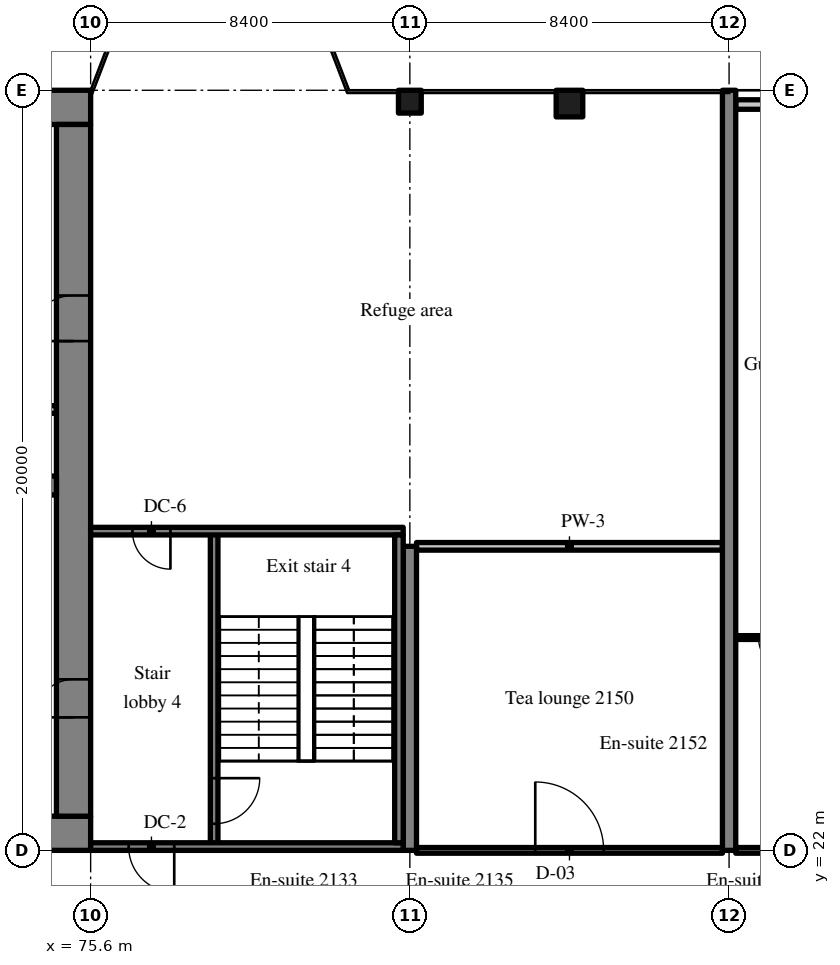
"""IFC4 building model, lengths in metres.
Left out: names, types, materials, properties, quantities, classifications, styles, units other than length and angle.
Written with IfcOpenShell. Run it as: python <this file> out.ifc"""

import sys

from ifc_helpers import new_model, si_unit, direction, frame, frame_2d, origin, origin_2d, place, context, subcontext, project, spatial, rectangle, extrude, source, transform, mapped, element, fill, save


model = new_model("IFC4")
c1 = context("Model", 3, precision=1e-05, world=origin(), true_north=direction((0.0, 1.0)))
c2 = subcontext(c1, "Body", "Model", "MODEL_VIEW")
j1 = project(units=[si_unit("LENGTHUNIT", "METRE"), si_unit("PLANEANGLEUNIT", "RADIAN")], contexts=[c1])
p1 = place(None, origin())
s1 = spatial("IfcSite", under=j1, at=p1, CompositionType="ELEMENT")
p2 = place(p1, origin())
s2 = spatial("IfcBuilding", under=s1, at=p2, CompositionType="ELEMENT")
p3 = place(p2, frame((0.0, 0.0, 91.4)))
s3 = spatial("IfcBuildingStorey", under=s2, at=p3, CompositionType="ELEMENT", Elevation=91.4)
m1 = source(origin(), c2, "Body", "SweptSolid", [
    extrude(rectangle(XDim=50.4, YDim=0.9, at=frame_2d((25.2, 0.0))), origin(), (0.0, 0.0, 1.0), 3.52),
])
p4 = place(p3, frame((25.2, 22.45, 0.0), z_axis=(0.0, 0.0, 1.0), x_axis=(1.0, 0.0, 0.0)))
e1 = element("IfcWall", 1, at=p4, inside=s3, PredefinedType="SHEAR", context=c2, shape_type="MappedRepresentation", body=[
    mapped(m1, transform((0.0, 0.0, 0.0), scale=1.0)),
])
m2 = source(origin(), c2, "Body", "SweptSolid", [
    extrude(rectangle(XDim=1.8, YDim=2.1, at=frame_2d((0.9, 1.05))), frame((0.0, 0.46, 0.0), z_axis=(0.0, -1.0, 0.0), x_axis=(1.0, 0.0, 0.0)), (0.0, 0.0, 1.0), 0.92),
])
p5 = place(p4, frame((15.9, 0.0, 0.0)))
e2 = element("IfcOpeningElement", 2, at=p5, cuts=e1, PredefinedType="OPENING", context=c2, shape_type="MappedRepresentation", body=[
    mapped(m2, transform((0.0, 0.0, 0.0), scale=1.0)),
])
m3 = source(origin(), c2, "Body", "SweptSolid", [
    extrude(rectangle(XDim=1.2, YDim=2.1, at=frame_2d((0.6, 1.05))), frame((0.0, 0.46, 0.0), z_axis=(0.0, -1.0, 0.0), x_axis=(1.0, 0.0, 0.0)), (0.0, 0.0, 1.0), 0.92),
])
p6 = place(p4, frame((26.975, 0.0, 0.0)))
e3 = element("IfcOpeningElement", 3, at=p6, cuts=e1, PredefinedType="OPENING", context=c2, shape_type="MappedRepresentation", body=[
    mapped(m3, transform((0.0, 0.0, 0.0), scale=1.0)),
])
m4 = source(origin(), c2, "Body", "SweptSolid", [
    extrude(rectangle(XDim=0.9, YDim=2.1, at=frame_2d((0.45, 1.05))), frame((0.0, 0.46, 0.0), z_axis=(0.0, -1.0, 0.0), x_axis=(1.0, 0.0, 0.0)), (0.0, 0.0, 1.0), 0.92),
])
p7 = place(p4, frame((34.5, 0.0, 0.0)))
e4 = element("IfcOpeningElement", 4, at=p7, cuts=e1, PredefinedType="OPENING", context=c2, shape_type="MappedRepresentation", body=[
    mapped(m4, transform((0.0, 0.0, 0.0), scale=1.0)),
])
p8 = place(p4, frame((31.5, 0.0, 0.0)))
e5 = element("IfcOpeningElement", 5, at=p8, cuts=e1, PredefinedType="OPENING", context=c2, shape_type="MappedRepresentation", body=[
    mapped(m4, transform((0.0, 0.0, 0.0), scale=1.0)),
])
p9 = place(p4, frame((39.788, 0.0, 0.0)))
e6 = element("IfcOpeningElement", 6, at=p9, cuts=e1, PredefinedType="OPENING", context=c2, shape_type="MappedRepresentation", body=[
    mapped(m4, transform((0.0, 0.0, 0.0), scale=1.0)),
])
p10 = place(p4, frame((36.762, 0.0, 0.0)))
e7 = element("IfcOpeningElement", 7, at=p10, cuts=e1, PredefinedType="OPENING", context=c2, shape_type="MappedRepresentation", body=[
    mapped(m4, transform((0.0, 0.0, 0.0), scale=1.0)),
])
p11 = place(p4, frame((6.45, 0.0, 0.0)))
e8 = element("IfcOpeningElement", 8, at=p11, cuts=e1, PredefinedType="OPENING", context=c2, shape_type="MappedRepresentation", body=[
    mapped(m3, transform((0.0, 0.0, 0.0), scale=1.0)),
])
p12 = place(p4, frame((47.775, 0.0, 0.0)))
e9 = element("IfcOpeningElement", 9, at=p12, cuts=e1, PredefinedType="OPENING", context=c2, shape_type="MappedRepresentation", body=[
    mapped(m3, transform((0.0, 0.0, 0.0), scale=1.0)),
])
p13 = place(p3, frame((25.2, 41.55, 0.0), z_axis=(0.0, 0.0, 1.0), x_axis=(1.0, 0.0, 0.0)))
e10 = element("IfcWall", 10, at=p13, inside=s3, PredefinedType="SHEAR", context=c2, shape_type="MappedRepresentation", body=[
    mapped(m1, transform((0.0, 0.0, 0.0), scale=1.0)),
])
m5 = source(origin(), c2, "Body", "SweptSolid", [
    extrude(rectangle(XDim=18.2, YDim=0.9, at=frame_2d((9.1, 0.0))), origin(), (0.0, 0.0, 1.0), 3.52),
])
p14 = place(p3, frame((75.15, 22.9, 0.0), z_axis=(0.0, 0.0, 1.0), x_axis=(0.0, 1.0, 0.0)))
e11 = element("IfcWall", 11, at=p14, inside=s3, PredefinedType="SHEAR", context=c2, shape_type="MappedRepresentation", body=[
    mapped(m5, transform((0.0, 0.0, 0.0), scale=1.0)),
])
m6 = source(origin(), c2, "Body", "SweptSolid", [
    extrude(rectangle(XDim=1.0, YDim=2.1, at=frame_2d((0.5, 1.05))), frame((0.0, 0.46, 0.0), z_axis=(0.0, -1.0, 0.0), x_axis=(1.0, 0.0, 0.0)), (0.0, 0.0, 1.0), 0.92),
])
p15 = place(p14, frame((2.6, 0.0, 0.0)))
e12 = element("IfcOpeningElement", 12, at=p15, cuts=e11, PredefinedType="OPENING", context=c2, shape_type="MappedRepresentation", body=[
    mapped(m6, transform((0.0, 0.0, 0.0), scale=1.0)),
])
p16 = place(p14, frame((12.5, 0.0, 0.0)))
e13 = element("IfcOpeningElement", 13, at=p16, cuts=e11, PredefinedType="OPENING", context=c2, shape_type="MappedRepresentation", body=[
    mapped(m3, transform((0.0, 0.0, 0.0), scale=1.0)),
])
m7 = source(origin(), c2, "Body", "SweptSolid", [
    extrude(rectangle(XDim=7.25, YDim=0.5, at=frame_2d((3.625, 0.0))), origin(), (0.0, 0.0, 1.0), 3.52),
])
p17 = place(p3, frame((67.45, 31.6, 0.0), z_axis=(0.0, 0.0, 1.0), x_axis=(1.0, 0.0, 0.0)))
e14 = element("IfcWall", 14, at=p17, inside=s3, PredefinedType="SHEAR", context=c2, shape_type="MappedRepresentation", body=[
    mapped(m7, transform((0.0, 0.0, 0.0), scale=1.0)),
])
m8 = source(origin(), c2, "Body", "SweptSolid", [
    extrude(rectangle(XDim=1.1, YDim=2.1, at=frame_2d((0.55, 1.05))), frame((0.0, 0.26, 0.0), z_axis=(0.0, -1.0, 0.0), x_axis=(1.0, 0.0, 0.0)), (0.0, 0.0, 1.0), 0.52),
])
p18 = place(p17, frame((5.575, 0.0, 0.0)))
e15 = element("IfcOpeningElement", 15, at=p18, cuts=e14, PredefinedType="OPENING", context=c2, shape_type="MappedRepresentation", body=[
    mapped(m8, transform((0.0, 0.0, 0.0), scale=1.0)),
])
m9 = source(origin(), c2, "Body", "SweptSolid", [
    extrude(rectangle(XDim=8.0, YDim=0.35, at=frame_2d((4.0, 0.0))), origin(), (0.0, 0.0, 1.0), 3.52),
])
p19 = place(p3, frame((84.0, 22.0, 0.0), z_axis=(0.0, 0.0, 1.0), x_axis=(0.0, 1.0, 0.0)))
e16 = element("IfcWall", 16, at=p19, inside=s3, PredefinedType="SHEAR", context=c2, shape_type="MappedRepresentation", body=[
    mapped(m9, transform((0.0, 0.0, 0.0), scale=1.0)),
])
m10 = source(origin(), c2, "Body", "SweptSolid", [
    extrude(rectangle(XDim=20.0, YDim=0.35, at=frame_2d((10.0, 0.0))), origin(), (0.0, 0.0, 1.0), 3.52),
])
p20 = place(p3, frame((92.4, 22.0, 0.0), z_axis=(0.0, 0.0, 1.0), x_axis=(0.0, 1.0, 0.0)))
e17 = element("IfcWall", 17, at=p20, inside=s3, PredefinedType="SHEAR", context=c2, shape_type="MappedRepresentation", body=[
    mapped(m10, transform((0.0, 0.0, 0.0), scale=1.0)),
])
m11 = source(origin(), c2, "Body", "SweptSolid", [
    extrude(rectangle(XDim=0.6, YDim=0.6, at=origin_2d()), origin(), (0.0, 0.0, 1.0), 3.52),
])
p21 = place(p3, frame((84.0, 41.7, 0.0), z_axis=(0.0, 0.0, 1.0), x_axis=(1.0, 0.0, 0.0)))
e18 = element("IfcColumn", 18, at=p21, inside=s3, PredefinedType="COLUMN", context=c2, shape_type="MappedRepresentation", body=[
    mapped(m11, transform((0.0, 0.0, 0.0), scale=1.0)),
])
m12 = source(origin(), c2, "Body", "SweptSolid", [
    extrude(rectangle(XDim=0.7, YDim=0.7, at=origin_2d()), origin(), (0.0, 0.0, 1.0), 3.52),
])
p22 = place(p3, frame((88.2, 41.65, 0.0), z_axis=(0.0, 0.0, 1.0), x_axis=(1.0, 0.0, 0.0)))
e19 = element("IfcColumn", 19, at=p22, inside=s3, PredefinedType="COLUMN", context=c2, shape_type="MappedRepresentation", body=[
    mapped(m12, transform((0.0, 0.0, 0.0), scale=1.0)),
])
m13 = source(origin(), c2, "Body", "SweptSolid", [
    extrude(rectangle(XDim=4.07, YDim=0.25, at=frame_2d((2.035, 0.0))), origin(), (0.0, 0.0, 1.0), 2.82),
])
p23 = place(p3, frame((96.645, 41.625, 0.0), z_axis=(0.0, 0.0, 1.0), x_axis=(-1.0, 0.0, 0.0)))
e20 = element("IfcWall", 20, at=p23, inside=s3, PredefinedType="SOLIDWALL", context=c2, shape_type="MappedRepresentation", body=[
    mapped(m13, transform((0.0, 0.0, 0.0), scale=1.0)),
])
m14 = source(origin(), c2, "Body", "SweptSolid", [
    extrude(rectangle(XDim=1.5, YDim=1.5, at=frame_2d((0.75, 0.75))), frame((0.0, 0.135, 0.0), z_axis=(0.0, -1.0, 0.0), x_axis=(1.0, 0.0, 0.0)), (0.0, 0.0, 1.0), 0.27),
])
p24 = place(p23, frame((1.285, 0.0, 0.9)))
e21 = element("IfcOpeningElement", 21, at=p24, cuts=e20, PredefinedType="OPENING", context=c2, shape_type="MappedRepresentation", body=[
    mapped(m14, transform((0.0, 0.0, 0.0), scale=1.0)),
])
m15 = source(origin(), c2, "Body", "SweptSolid", [
    extrude(rectangle(XDim=2.25, YDim=0.2, at=frame_2d((1.125, 0.0))), origin(), (0.0, 0.0, 1.0), 3.52),
])
p25 = place(p3, frame((72.45, 33.6, 0.0), z_axis=(0.0, 0.0, 1.0), x_axis=(1.0, 0.0, 0.0)))
e22 = element("IfcWall", 22, at=p25, inside=s3, PredefinedType="SOLIDWALL", context=c2, shape_type="MappedRepresentation", body=[
    mapped(m15, transform((0.0, 0.0, 0.0), scale=1.0)),
])
m16 = source(origin(), c2, "Body", "SweptSolid", [
    extrude(rectangle(XDim=8.3, YDim=0.2, at=frame_2d((4.15, 0.0))), origin(), (0.0, 0.0, 1.0), 3.52),
])
p26 = place(p3, frame((78.85, 22.1, 0.0), z_axis=(0.0, 0.0, 1.0), x_axis=(0.0, 1.0, 0.0)))
e23 = element("IfcWall", 23, at=p26, inside=s3, PredefinedType="SOLIDWALL", context=c2, shape_type="MappedRepresentation", body=[
    mapped(m16, transform((0.0, 0.0, 0.0), scale=1.0)),
])
m17 = source(origin(), c2, "Body", "SweptSolid", [
    extrude(rectangle(XDim=1.2, YDim=2.1, at=frame_2d((0.6, 1.05))), frame((0.0, 0.11, 0.0), z_axis=(0.0, -1.0, 0.0), x_axis=(1.0, 0.0, 0.0)), (0.0, 0.0, 1.0), 0.22),
])
p27 = place(p26, frame((0.6, 0.0, 0.0)))
e24 = element("IfcOpeningElement", 24, at=p27, cuts=e23, PredefinedType="OPENING", context=c2, shape_type="MappedRepresentation", body=[
    mapped(m17, transform((0.0, 0.0, 0.0), scale=1.0)),
])
m18 = source(origin(), c2, "Body", "SweptSolid", [
    extrude(rectangle(XDim=8.225, YDim=0.2, at=frame_2d((4.112, 0.0))), origin(), (0.0, 0.0, 1.0), 3.52),
])
p28 = place(p3, frame((83.825, 22.1, 0.0), z_axis=(0.0, 0.0, 1.0), x_axis=(-1.0, 0.0, 0.0)))
e25 = element("IfcWall", 25, at=p28, inside=s3, PredefinedType="SOLIDWALL", context=c2, shape_type="MappedRepresentation", body=[
    mapped(m18, transform((0.0, 0.0, 0.0), scale=1.0)),
])
p29 = place(p28, frame((6.025, 0.0, 0.0)))
e26 = element("IfcOpeningElement", 26, at=p29, cuts=e25, PredefinedType="OPENING", context=c2, shape_type="MappedRepresentation", body=[
    mapped(m17, transform((0.0, 0.0, 0.0), scale=1.0)),
])
p30 = place(p3, frame((83.825, 30.4, 0.0), z_axis=(0.0, 0.0, 1.0), x_axis=(-1.0, 0.0, 0.0)))
e27 = element("IfcWall", 27, at=p30, inside=s3, PredefinedType="SOLIDWALL", context=c2, shape_type="MappedRepresentation", body=[
    mapped(m18, transform((0.0, 0.0, 0.0), scale=1.0)),
])
m19 = source(origin(), c2, "Body", "SweptSolid", [
    extrude(rectangle(XDim=1.0, YDim=2.1, at=frame_2d((0.5, 1.05))), frame((0.0, 0.11, 0.0), z_axis=(0.0, -1.0, 0.0), x_axis=(1.0, 0.0, 0.0)), (0.0, 0.0, 1.0), 0.22),
])
p31 = place(p30, frame((6.125, 0.0, 0.0)))
e28 = element("IfcOpeningElement", 28, at=p31, cuts=e27, PredefinedType="OPENING", context=c2, shape_type="MappedRepresentation", body=[
    mapped(m19, transform((0.0, 0.0, 0.0), scale=1.0)),
])
m20 = source(origin(), c2, "Body", "SweptSolid", [
    extrude(rectangle(XDim=8.1, YDim=0.225, at=frame_2d((4.05, 0.0))), origin(), (0.0, 0.0, 1.0), 3.52),
])
p32 = place(p3, frame((83.713, 22.2, 0.0), z_axis=(0.0, 0.0, 1.0), x_axis=(0.0, 1.0, 0.0)))
e29 = element("IfcWall", 29, at=p32, inside=s3, PredefinedType="SOLIDWALL", context=c2, shape_type="MappedRepresentation", body=[
    mapped(m20, transform((0.0, 0.0, 0.0), scale=1.0)),
])
m21 = source(origin(), c2, "Body", "SweptSolid", [
    extrude(rectangle(XDim=8.05, YDim=0.15, at=frame_2d((4.025, 0.0))), origin(), (0.0, 0.0, 1.0), 2.82),
])
p33 = place(p3, frame((84.175, 22.0, 0.0), z_axis=(0.0, 0.0, 1.0), x_axis=(1.0, 0.0, 0.0)))
e30 = element("IfcWall", 30, at=p33, inside=s3, PredefinedType="PARTITIONING", context=c2, shape_type="MappedRepresentation", body=[
    mapped(m21, transform((0.0, 0.0, 0.0), scale=1.0)),
])
m22 = source(origin(), c2, "Body", "SweptSolid", [
    extrude(rectangle(XDim=1.8, YDim=2.1, at=frame_2d((0.9, 1.05))), frame((0.0, 0.085, 0.0), z_axis=(0.0, -1.0, 0.0), x_axis=(1.0, 0.0, 0.0)), (0.0, 0.0, 1.0), 0.17),
])
p34 = place(p33, frame((3.125, 0.0, 0.0)))
e31 = element("IfcOpeningElement", 31, at=p34, cuts=e30, PredefinedType="OPENING", context=c2, shape_type="MappedRepresentation", body=[
    mapped(m22, transform((0.0, 0.0, 0.0), scale=1.0)),
])
m23 = source(origin(), c2, "Body", "SweptSolid", [
    extrude(rectangle(XDim=8.05, YDim=0.2, at=frame_2d((4.025, 0.0))), origin(), (0.0, 0.0, 1.0), 3.52),
])
p35 = place(p3, frame((84.175, 30.0, 0.0), z_axis=(0.0, 0.0, 1.0), x_axis=(1.0, 0.0, 0.0)))
e32 = element("IfcWall", 32, at=p35, inside=s3, PredefinedType="PARTITIONING", context=c2, shape_type="MappedRepresentation", body=[
    mapped(m23, transform((0.0, 0.0, 0.0), scale=1.0)),
])
m24 = source(origin(), c2, "Body", "SweptSolid", [
    extrude(rectangle(XDim=2.1, YDim=0.1, at=frame_2d((1.05, 0.0))), origin(), (0.0, 0.0, 1.0), 3.52),
])
p36 = place(p3, frame((92.575, 27.6, 0.0), z_axis=(0.0, 0.0, 1.0), x_axis=(1.0, 0.0, 0.0)))
e33 = element("IfcWall", 33, at=p36, inside=s3, PredefinedType="PARTITIONING", context=c2, shape_type="MappedRepresentation", body=[
    mapped(m24, transform((0.0, 0.0, 0.0), scale=1.0)),
])
m25 = source(origin(), c2, "Body", "SweptSolid", [
    extrude(rectangle(XDim=0.9, YDim=2.1, at=frame_2d((0.45, 1.05))), frame((0.0, 0.06, 0.0), z_axis=(0.0, -1.0, 0.0), x_axis=(1.0, 0.0, 0.0)), (0.0, 0.0, 1.0), 0.12),
])
p37 = place(p36, frame((0.6, 0.0, 0.0)))
e34 = element("IfcOpeningElement", 34, at=p37, cuts=e33, PredefinedType="OPENING", context=c2, shape_type="MappedRepresentation", body=[
    mapped(m25, transform((0.0, 0.0, 0.0), scale=1.0)),
])
m26 = source(origin(), c2, "Body", "SweptSolid", [
    extrude(rectangle(XDim=3.95, YDim=0.15, at=frame_2d((1.975, 0.0))), origin(), (0.0, 0.0, 1.0), 2.82),
])
p38 = place(p3, frame((92.575, 22.0, 0.0), z_axis=(0.0, 0.0, 1.0), x_axis=(1.0, 0.0, 0.0)))
e35 = element("IfcWall", 35, at=p38, inside=s3, PredefinedType="PARTITIONING", context=c2, shape_type="MappedRepresentation", body=[
    mapped(m26, transform((0.0, 0.0, 0.0), scale=1.0)),
])
m27 = source(origin(), c2, "Body", "SweptSolid", [
    extrude(rectangle(XDim=1.0, YDim=2.1, at=frame_2d((0.5, 1.05))), frame((0.0, 0.085, 0.0), z_axis=(0.0, -1.0, 0.0), x_axis=(1.0, 0.0, 0.0)), (0.0, 0.0, 1.0), 0.17),
])
p39 = place(p38, frame((2.55, 0.0, 0.0)))
e36 = element("IfcOpeningElement", 36, at=p39, cuts=e35, PredefinedType="OPENING", context=c2, shape_type="MappedRepresentation", body=[
    mapped(m27, transform((0.0, 0.0, 0.0), scale=1.0)),
])
m28 = source(origin(), c2, "Body", "SweptSolid", [
    extrude(rectangle(XDim=1.0, YDim=2.1, at=frame_2d((0.5, 1.05))), frame((0.0, 0.025, 0.0), z_axis=(0.0, -1.0, 0.0), x_axis=(1.0, 0.0, 0.0)), (0.0, 0.0, 1.0), 0.05),
])
p40 = place(p15, origin())
e37 = element("IfcDoor", 37, at=p40, inside=s3, OperationType="SINGLE_SWING_LEFT", PredefinedType="DOOR", context=c2, shape_type="MappedRepresentation", body=[
    mapped(m28, transform((0.0, 0.0, 0.0), scale=1.0)),
])
fill(e12, e37)
m29 = source(origin(), c2, "Body", "SweptSolid", [
    extrude(rectangle(XDim=1.2, YDim=2.1, at=frame_2d((0.6, 1.05))), frame((0.0, 0.025, 0.0), z_axis=(0.0, -1.0, 0.0), x_axis=(1.0, 0.0, 0.0)), (0.0, 0.0, 1.0), 0.05),
])
p41 = place(p16, origin())
e38 = element("IfcDoor", 38, at=p41, inside=s3, OperationType="SINGLE_SWING_LEFT", PredefinedType="DOOR", context=c2, shape_type="MappedRepresentation", body=[
    mapped(m29, transform((0.0, 0.0, 0.0), scale=1.0)),
])
fill(e13, e38)
p42 = place(p27, origin())
e39 = element("IfcDoor", 39, at=p42, inside=s3, OperationType="SINGLE_SWING_RIGHT", PredefinedType="DOOR", context=c2, shape_type="MappedRepresentation", body=[
    mapped(m29, transform((0.0, 0.0, 0.0), scale=1.0)),
])
fill(e24, e39)
p43 = place(p29, origin())
e40 = element("IfcDoor", 40, at=p43, inside=s3, OperationType="SINGLE_SWING_LEFT", PredefinedType="DOOR", context=c2, shape_type="MappedRepresentation", body=[
    mapped(m29, transform((0.0, 0.0, 0.0), scale=1.0)),
])
fill(e26, e40)
p44 = place(p31, origin())
e41 = element("IfcDoor", 41, at=p44, inside=s3, OperationType="SINGLE_SWING_LEFT", PredefinedType="DOOR", context=c2, shape_type="MappedRepresentation", body=[
    mapped(m28, transform((0.0, 0.0, 0.0), scale=1.0)),
])
fill(e28, e41)
m30 = source(origin(), c2, "Body", "SweptSolid", [
    extrude(rectangle(XDim=1.8, YDim=2.1, at=frame_2d((0.9, 1.05))), frame((0.0, 0.025, 0.0), z_axis=(0.0, -1.0, 0.0), x_axis=(1.0, 0.0, 0.0)), (0.0, 0.0, 1.0), 0.05),
])
p45 = place(p34, origin())
e42 = element("IfcDoor", 42, at=p45, inside=s3, OperationType="DOUBLE_DOOR_SINGLE_SWING", PredefinedType="DOOR", context=c2, shape_type="MappedRepresentation", body=[
    mapped(m30, transform((0.0, 0.0, 0.0), scale=1.0)),
])
fill(e31, e42)
m31 = source(origin(), c2, "Body", "SweptSolid", [
    extrude(rectangle(XDim=0.9, YDim=2.1, at=frame_2d((0.45, 1.05))), frame((0.0, 0.025, 0.0), z_axis=(0.0, -1.0, 0.0), x_axis=(1.0, 0.0, 0.0)), (0.0, 0.0, 1.0), 0.05),
])
p46 = place(p37, origin())
e43 = element("IfcDoor", 43, at=p46, inside=s3, OperationType="SINGLE_SWING_RIGHT", PredefinedType="DOOR", context=c2, shape_type="MappedRepresentation", body=[
    mapped(m31, transform((0.0, 0.0, 0.0), scale=1.0)),
])
fill(e34, e43)
save(model, sys.argv[1])
